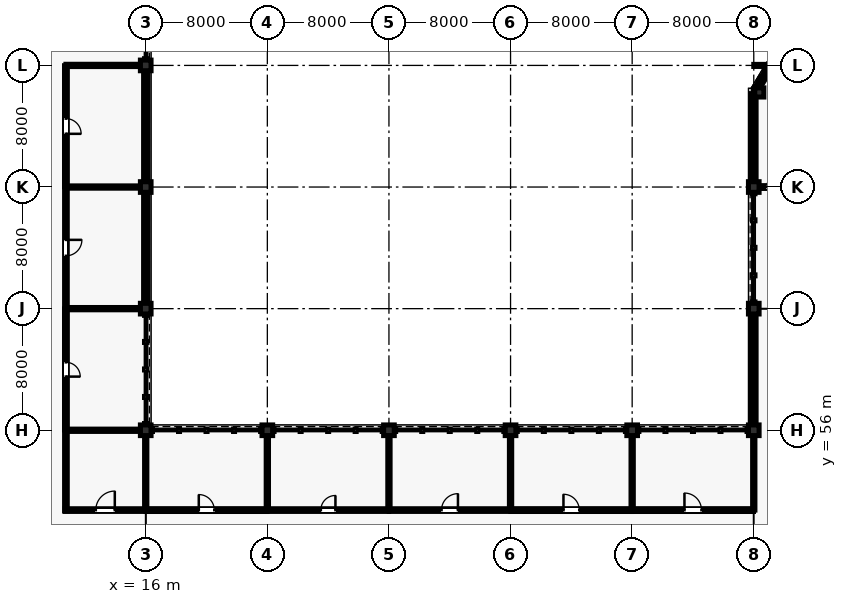
"""IFC4 building model, lengths in metres.
Left out: names, types, materials, properties, quantities, classifications, styles, units other than length and angle.
Written with IfcOpenShell. Run it as: python <this file> out.ifc"""

import sys

from ifc_helpers import new_model, si_unit, direction, frame, frame_2d, origin, origin_2d, place, context, subcontext, project, spatial, rectangle, extrude, element, fill, save


model = new_model("IFC4")
c1 = context("Model", 3, precision=1e-05, world=origin(), true_north=direction((0.0, 1.0)))
c2 = subcontext(c1, "Body", "Model", "MODEL_VIEW")
j1 = project(units=[si_unit("LENGTHUNIT", "METRE"), si_unit("PLANEANGLEUNIT", "RADIAN")], contexts=[c1])
p1 = place(None, origin())
s1 = spatial("IfcSite", under=j1, at=p1, CompositionType="ELEMENT")
p2 = place(p1, origin())
s2 = spatial("IfcBuilding", under=s1, at=p2, CompositionType="ELEMENT")
p3 = place(p2, origin())
s3 = spatial("IfcBuildingStorey", under=s2, at=p3, CompositionType="ELEMENT", Elevation=0.0)
for number, where, z_axis, x_axis in (
    (1, (16.0, 56.0, 0.0), (0.0, 0.0, 1.0), (1.0, 0.0, 0.0)),
    (2, (16.0, 64.0, 0.0), (0.0, 0.0, 1.0), (1.0, 0.0, 0.0)),
    (3, (16.0, 72.0, 0.0), (0.0, 0.0, 1.0), (1.0, 0.0, 0.0)),
    (4, (16.0, 80.0, 0.0), (0.0, 0.0, 1.0), (1.0, 0.0, 0.0)),
    (5, (24.0, 56.0, 0.0), (0.0, 0.0, 1.0), (1.0, 0.0, 0.0)),
    (6, (32.0, 56.0, 0.0), (0.0, 0.0, 1.0), (1.0, 0.0, 0.0)),
    (7, (40.0, 56.0, 0.0), (0.0, 0.0, 1.0), (1.0, 0.0, 0.0)),
    (8, (48.0, 56.0, 0.0), (0.0, 0.0, 1.0), (1.0, 0.0, 0.0)),
    (9, (56.0, 56.0, 0.0), (0.0, 0.0, 1.0), (1.0, 0.0, 0.0)),
    (10, (56.0, 64.0, 0.0), (0.0, 0.0, 1.0), (1.0, 0.0, 0.0)),
    (11, (56.0, 72.0, 0.0), (0.0, 0.0, 1.0), (1.0, 0.0, 0.0)),
):
    element("IfcColumn", number, at=place(p3, frame(where, z_axis=z_axis, x_axis=x_axis)), inside=s3, PredefinedType="COLUMN", context=c2, shape_type="SweptSolid", body=[
        extrude(rectangle(XDim=0.7, YDim=0.7, at=origin_2d()), origin(), (0.0, 0.0, 1.0), 5.28),
    ])
p4 = place(p3, frame((56.364, 78.221, 0.0), z_axis=(0.0, 0.0, 1.0), x_axis=(1.0, 0.0, 0.0)))
e12 = element("IfcColumn", 12, at=p4, inside=s3, PredefinedType="COLUMN", context=c2, shape_type="SweptSolid", body=[
    extrude(rectangle(XDim=0.6, YDim=0.6, at=origin_2d()), origin(), (0.0, 0.0, 1.0), 5.28),
])
p5 = place(p3, frame((57.059, 79.888, 0.0), z_axis=(0.0, 0.0, 1.0), x_axis=(-0.51607516088, -0.856543302071, 0.0)))
e13 = element("IfcWall", 13, at=p5, inside=s3, PredefinedType="SOLIDWALL", context=c2, shape_type="SweptSolid", body=[
    extrude(rectangle(XDim=1.795, YDim=0.305, at=frame_2d((0.897, 0.0))), origin(), (0.0, 0.0, 1.0), 5.035),
])
p6 = place(p3, frame((16.0, 64.335, 0.0), z_axis=(0.0, 0.0, 1.0), x_axis=(0.0, 1.0, 0.0)))
e14 = element("IfcWall", 14, at=p6, inside=s3, PredefinedType="SOLIDWALL", context=c2, shape_type="SweptSolid", body=[
    extrude(rectangle(XDim=7.33, YDim=0.28, at=frame_2d((3.665, 0.0))), origin(), (0.0, 0.0, 1.0), 4.619),
])
p7 = place(p6, frame((2.59, 0.0, 0.9)))
e15 = element("IfcOpeningElement", 15, at=p7, cuts=e14, PredefinedType="OPENING", context=c2, shape_type="SweptSolid", body=[
    extrude(rectangle(XDim=2.15, YDim=2.8, at=frame_2d((1.075, 1.4))), frame((0.0, 0.15, 0.0), z_axis=(0.0, -1.0, 0.0), x_axis=(1.0, 0.0, 0.0)), (0.0, 0.0, 1.0), 0.3),
])
p8 = place(p3, frame((16.0, 72.335, 0.0), z_axis=(0.0, 0.0, 1.0), x_axis=(0.0, 1.0, 0.0)))
e16 = element("IfcWall", 16, at=p8, inside=s3, PredefinedType="SOLIDWALL", context=c2, shape_type="SweptSolid", body=[
    extrude(rectangle(XDim=7.33, YDim=0.28, at=frame_2d((3.665, 0.0))), origin(), (0.0, 0.0, 1.0), 4.682),
])
p9 = place(p8, frame((2.74, 0.0, 0.9)))
e17 = element("IfcOpeningElement", 17, at=p9, cuts=e16, PredefinedType="OPENING", context=c2, shape_type="SweptSolid", body=[
    extrude(rectangle(XDim=1.85, YDim=2.65, at=frame_2d((0.925, 1.325))), frame((0.0, 0.15, 0.0), z_axis=(0.0, -1.0, 0.0), x_axis=(1.0, 0.0, 0.0)), (0.0, 0.0, 1.0), 0.3),
])
p10 = place(p3, frame((56.0, 56.335, 0.0), z_axis=(0.0, 0.0, 1.0), x_axis=(0.0, 1.0, 0.0)))
e18 = element("IfcWall", 18, at=p10, inside=s3, PredefinedType="SOLIDWALL", context=c2, shape_type="SweptSolid", body=[
    extrude(rectangle(XDim=7.33, YDim=0.305, at=frame_2d((3.665, 0.0))), origin(), (0.0, 0.0, 1.0), 4.614),
])
p11 = place(p10, frame((0.744, 0.0, 0.95)))
e19 = element("IfcOpeningElement", 19, at=p11, cuts=e18, PredefinedType="OPENING", context=c2, shape_type="SweptSolid", body=[
    extrude(rectangle(XDim=1.15, YDim=1.65, at=frame_2d((0.575, 0.825))), frame((0.0, 0.162, 0.0), z_axis=(0.0, -1.0, 0.0), x_axis=(1.0, 0.0, 0.0)), (0.0, 0.0, 1.0), 0.325),
])
p12 = place(p10, frame((5.436, 0.0, 0.95)))
e20 = element("IfcOpeningElement", 20, at=p12, cuts=e18, PredefinedType="OPENING", context=c2, shape_type="SweptSolid", body=[
    extrude(rectangle(XDim=1.15, YDim=1.65, at=frame_2d((0.575, 0.825))), frame((0.0, 0.162, 0.0), z_axis=(0.0, -1.0, 0.0), x_axis=(1.0, 0.0, 0.0)), (0.0, 0.0, 1.0), 0.325),
])
p13 = place(p3, frame((56.0, 72.335, 0.0), z_axis=(0.0, 0.0, 1.0), x_axis=(0.0, 1.0, 0.0)))
e21 = element("IfcWall", 21, at=p13, inside=s3, PredefinedType="SOLIDWALL", context=c2, shape_type="SweptSolid", body=[
    extrude(rectangle(XDim=5.811, YDim=0.305, at=frame_2d((2.905, 0.0))), origin(), (0.0, 0.0, 1.0), 5.035),
])
p14 = place(p13, frame((1.705, 0.0, 0.9)))
e22 = element("IfcOpeningElement", 22, at=p14, cuts=e21, PredefinedType="OPENING", context=c2, shape_type="SweptSolid", body=[
    extrude(rectangle(XDim=2.4, YDim=2.8, at=frame_2d((1.2, 1.4))), frame((0.0, 0.162, 0.0), z_axis=(0.0, -1.0, 0.0), x_axis=(1.0, 0.0, 0.0)), (0.0, 0.0, 1.0), 0.325),
])
p15 = place(p3, frame((10.7, 50.75, 0.0), z_axis=(0.0, 0.0, 1.0), x_axis=(1.0, 0.0, 0.0)))
e23 = element("IfcWall", 23, at=p15, inside=s3, PredefinedType="PARTITIONING", context=c2, shape_type="SweptSolid", body=[
    extrude(rectangle(XDim=5.28, YDim=0.175, at=frame_2d((2.64, 0.0))), origin(), (0.0, 0.0, 1.0), 4.403),
])
p16 = place(p15, frame((2.015, 0.0, 0.0)))
e24 = element("IfcOpeningElement", 24, at=p16, cuts=e23, PredefinedType="OPENING", context=c2, shape_type="SweptSolid", body=[
    extrude(rectangle(XDim=1.25, YDim=2.18, at=frame_2d((0.625, 1.09))), frame((0.0, 0.097, 0.0), z_axis=(0.0, -1.0, 0.0), x_axis=(1.0, 0.0, 0.0)), (0.0, 0.0, 1.0), 0.195),
])
p17 = place(p3, frame((10.75, 50.7, 0.0), z_axis=(0.0, 0.0, 1.0), x_axis=(0.0, 1.0, 0.0)))
e25 = element("IfcWall", 25, at=p17, inside=s3, PredefinedType="PARTITIONING", context=c2, shape_type="SweptSolid", body=[
    extrude(rectangle(XDim=5.28, YDim=0.175, at=frame_2d((2.64, 0.0))), origin(), (0.0, 0.0, 1.0), 4.327),
])
p18 = place(p3, frame((10.75, 56.0, 0.0), z_axis=(0.0, 0.0, 1.0), x_axis=(1.0, 0.0, 0.0)))
e26 = element("IfcWall", 26, at=p18, inside=s3, PredefinedType="PARTITIONING", context=c2, shape_type="SweptSolid", body=[
    extrude(rectangle(XDim=4.89, YDim=0.15, at=frame_2d((2.445, 0.0))), origin(), (0.0, 0.0, 1.0), 4.327),
])
p19 = place(p3, frame((16.0, 50.75, 0.0), z_axis=(0.0, 0.0, 1.0), x_axis=(0.0, 1.0, 0.0)))
e27 = element("IfcWall", 27, at=p19, inside=s3, PredefinedType="PARTITIONING", context=c2, shape_type="SweptSolid", body=[
    extrude(rectangle(XDim=4.89, YDim=0.15, at=frame_2d((2.445, 0.0))), origin(), (0.0, 0.0, 1.0), 4.403),
])
p20 = place(p3, frame((10.75, 56.02, 0.0), z_axis=(0.0, 0.0, 1.0), x_axis=(0.0, 1.0, 0.0)))
e28 = element("IfcWall", 28, at=p20, inside=s3, PredefinedType="PARTITIONING", context=c2, shape_type="SweptSolid", body=[
    extrude(rectangle(XDim=7.96, YDim=0.185, at=frame_2d((3.98, 0.0))), origin(), (0.0, 0.0, 1.0), 4.327),
])
p21 = place(p20, frame((3.51, 0.0, 0.0)))
e29 = element("IfcOpeningElement", 29, at=p21, cuts=e28, PredefinedType="OPENING", context=c2, shape_type="SweptSolid", body=[
    extrude(rectangle(XDim=0.94, YDim=2.12, at=frame_2d((0.47, 1.06))), frame((0.0, 0.103, 0.0), z_axis=(0.0, -1.0, 0.0), x_axis=(1.0, 0.0, 0.0)), (0.0, 0.0, 1.0), 0.205),
])
p22 = place(p3, frame((10.75, 64.0, 0.0), z_axis=(0.0, 0.0, 1.0), x_axis=(1.0, 0.0, 0.0)))
e30 = element("IfcWall", 30, at=p22, inside=s3, PredefinedType="PARTITIONING", context=c2, shape_type="SweptSolid", body=[
    extrude(rectangle(XDim=4.89, YDim=0.15, at=frame_2d((2.445, 0.0))), origin(), (0.0, 0.0, 1.0), 4.408),
])
p23 = place(p3, frame((10.75, 64.02, 0.0), z_axis=(0.0, 0.0, 1.0), x_axis=(0.0, 1.0, 0.0)))
e31 = element("IfcWall", 31, at=p23, inside=s3, PredefinedType="PARTITIONING", context=c2, shape_type="SweptSolid", body=[
    extrude(rectangle(XDim=7.96, YDim=0.175, at=frame_2d((3.98, 0.0))), origin(), (0.0, 0.0, 1.0), 4.341),
])
p24 = place(p23, frame((3.455, 0.0, 0.0)))
e32 = element("IfcOpeningElement", 32, at=p24, cuts=e31, PredefinedType="OPENING", context=c2, shape_type="SweptSolid", body=[
    extrude(rectangle(XDim=1.05, YDim=2.15, at=frame_2d((0.525, 1.075))), frame((0.0, 0.097, 0.0), z_axis=(0.0, -1.0, 0.0), x_axis=(1.0, 0.0, 0.0)), (0.0, 0.0, 1.0), 0.195),
])
p25 = place(p3, frame((10.75, 72.0, 0.0), z_axis=(0.0, 0.0, 1.0), x_axis=(1.0, 0.0, 0.0)))
e33 = element("IfcWall", 33, at=p25, inside=s3, PredefinedType="PARTITIONING", context=c2, shape_type="SweptSolid", body=[
    extrude(rectangle(XDim=4.89, YDim=0.15, at=frame_2d((2.445, 0.0))), origin(), (0.0, 0.0, 1.0), 4.341),
])
p26 = place(p3, frame((10.75, 72.02, 0.0), z_axis=(0.0, 0.0, 1.0), x_axis=(0.0, 1.0, 0.0)))
e34 = element("IfcWall", 34, at=p26, inside=s3, PredefinedType="PARTITIONING", context=c2, shape_type="SweptSolid", body=[
    extrude(rectangle(XDim=7.96, YDim=0.185, at=frame_2d((3.98, 0.0))), origin(), (0.0, 0.0, 1.0), 4.341),
])
p27 = place(p26, frame((3.48, 0.0, 0.0)))
e35 = element("IfcOpeningElement", 35, at=p27, cuts=e34, PredefinedType="OPENING", context=c2, shape_type="SweptSolid", body=[
    extrude(rectangle(XDim=1.0, YDim=2.15, at=frame_2d((0.5, 1.075))), frame((0.0, 0.103, 0.0), z_axis=(0.0, -1.0, 0.0), x_axis=(1.0, 0.0, 0.0)), (0.0, 0.0, 1.0), 0.205),
])
p28 = place(p3, frame((10.75, 80.0, 0.0), z_axis=(0.0, 0.0, 1.0), x_axis=(1.0, 0.0, 0.0)))
e36 = element("IfcWall", 36, at=p28, inside=s3, PredefinedType="PARTITIONING", context=c2, shape_type="SweptSolid", body=[
    extrude(rectangle(XDim=4.89, YDim=0.15, at=frame_2d((2.445, 0.0))), origin(), (0.0, 0.0, 1.0), 4.409),
])
p29 = place(p3, frame((16.02, 50.75, 0.0), z_axis=(0.0, 0.0, 1.0), x_axis=(1.0, 0.0, 0.0)))
e37 = element("IfcWall", 37, at=p29, inside=s3, PredefinedType="PARTITIONING", context=c2, shape_type="SweptSolid", body=[
    extrude(rectangle(XDim=7.96, YDim=0.185, at=frame_2d((3.98, 0.0))), origin(), (0.0, 0.0, 1.0), 4.403),
])
p30 = place(p29, frame((3.47, 0.0, 0.0)))
e38 = element("IfcOpeningElement", 38, at=p30, cuts=e37, PredefinedType="OPENING", context=c2, shape_type="SweptSolid", body=[
    extrude(rectangle(XDim=1.02, YDim=2.2, at=frame_2d((0.51, 1.1))), frame((0.0, 0.103, 0.0), z_axis=(0.0, -1.0, 0.0), x_axis=(1.0, 0.0, 0.0)), (0.0, 0.0, 1.0), 0.205),
])
p31 = place(p3, frame((24.0, 50.75, 0.0), z_axis=(0.0, 0.0, 1.0), x_axis=(0.0, 1.0, 0.0)))
e39 = element("IfcWall", 39, at=p31, inside=s3, PredefinedType="PARTITIONING", context=c2, shape_type="SweptSolid", body=[
    extrude(rectangle(XDim=4.89, YDim=0.15, at=frame_2d((2.445, 0.0))), origin(), (0.0, 0.0, 1.0), 4.412),
])
p32 = place(p3, frame((24.02, 50.75, 0.0), z_axis=(0.0, 0.0, 1.0), x_axis=(1.0, 0.0, 0.0)))
e40 = element("IfcWall", 40, at=p32, inside=s3, PredefinedType="PARTITIONING", context=c2, shape_type="SweptSolid", body=[
    extrude(rectangle(XDim=7.96, YDim=0.175, at=frame_2d((3.98, 0.0))), origin(), (0.0, 0.0, 1.0), 4.404),
])
p33 = place(p32, frame((3.5, 0.0, 0.0)))
e41 = element("IfcOpeningElement", 41, at=p33, cuts=e40, PredefinedType="OPENING", context=c2, shape_type="SweptSolid", body=[
    extrude(rectangle(XDim=0.96, YDim=2.14, at=frame_2d((0.48, 1.07))), frame((0.0, 0.097, 0.0), z_axis=(0.0, -1.0, 0.0), x_axis=(1.0, 0.0, 0.0)), (0.0, 0.0, 1.0), 0.195),
])
p34 = place(p3, frame((32.0, 50.75, 0.0), z_axis=(0.0, 0.0, 1.0), x_axis=(0.0, 1.0, 0.0)))
e42 = element("IfcWall", 42, at=p34, inside=s3, PredefinedType="PARTITIONING", context=c2, shape_type="SweptSolid", body=[
    extrude(rectangle(XDim=4.89, YDim=0.15, at=frame_2d((2.445, 0.0))), origin(), (0.0, 0.0, 1.0), 4.404),
])
p35 = place(p3, frame((32.02, 50.75, 0.0), z_axis=(0.0, 0.0, 1.0), x_axis=(1.0, 0.0, 0.0)))
e43 = element("IfcWall", 43, at=p35, inside=s3, PredefinedType="PARTITIONING", context=c2, shape_type="SweptSolid", body=[
    extrude(rectangle(XDim=7.96, YDim=0.175, at=frame_2d((3.98, 0.0))), origin(), (0.0, 0.0, 1.0), 4.404),
])
p36 = place(p35, frame((3.44, 0.0, 0.0)))
e44 = element("IfcOpeningElement", 44, at=p36, cuts=e43, PredefinedType="OPENING", context=c2, shape_type="SweptSolid", body=[
    extrude(rectangle(XDim=1.08, YDim=2.2, at=frame_2d((0.54, 1.1))), frame((0.0, 0.097, 0.0), z_axis=(0.0, -1.0, 0.0), x_axis=(1.0, 0.0, 0.0)), (0.0, 0.0, 1.0), 0.195),
])
p37 = place(p3, frame((40.0, 50.75, 0.0), z_axis=(0.0, 0.0, 1.0), x_axis=(0.0, 1.0, 0.0)))
e45 = element("IfcWall", 45, at=p37, inside=s3, PredefinedType="PARTITIONING", context=c2, shape_type="SweptSolid", body=[
    extrude(rectangle(XDim=4.89, YDim=0.15, at=frame_2d((2.445, 0.0))), origin(), (0.0, 0.0, 1.0), 4.471),
])
p38 = place(p3, frame((40.02, 50.75, 0.0), z_axis=(0.0, 0.0, 1.0), x_axis=(1.0, 0.0, 0.0)))
e46 = element("IfcWall", 46, at=p38, inside=s3, PredefinedType="PARTITIONING", context=c2, shape_type="SweptSolid", body=[
    extrude(rectangle(XDim=7.96, YDim=0.185, at=frame_2d((3.98, 0.0))), origin(), (0.0, 0.0, 1.0), 4.403),
])
p39 = place(p38, frame((3.46, 0.0, 0.0)))
e47 = element("IfcOpeningElement", 47, at=p39, cuts=e46, PredefinedType="OPENING", context=c2, shape_type="SweptSolid", body=[
    extrude(rectangle(XDim=1.04, YDim=2.18, at=frame_2d((0.52, 1.09))), frame((0.0, 0.103, 0.0), z_axis=(0.0, -1.0, 0.0), x_axis=(1.0, 0.0, 0.0)), (0.0, 0.0, 1.0), 0.205),
])
p40 = place(p3, frame((48.0, 50.75, 0.0), z_axis=(0.0, 0.0, 1.0), x_axis=(0.0, 1.0, 0.0)))
e48 = element("IfcWall", 48, at=p40, inside=s3, PredefinedType="PARTITIONING", context=c2, shape_type="SweptSolid", body=[
    extrude(rectangle(XDim=4.89, YDim=0.15, at=frame_2d((2.445, 0.0))), origin(), (0.0, 0.0, 1.0), 4.403),
])
p41 = place(p3, frame((48.02, 50.75, 0.0), z_axis=(0.0, 0.0, 1.0), x_axis=(1.0, 0.0, 0.0)))
e49 = element("IfcWall", 49, at=p41, inside=s3, PredefinedType="PARTITIONING", context=c2, shape_type="SweptSolid", body=[
    extrude(rectangle(XDim=7.96, YDim=0.185, at=frame_2d((3.98, 0.0))), origin(), (0.0, 0.0, 1.0), 4.403),
])
p42 = place(p41, frame((3.42, 0.0, 0.0)))
e50 = element("IfcOpeningElement", 50, at=p42, cuts=e49, PredefinedType="OPENING", context=c2, shape_type="SweptSolid", body=[
    extrude(rectangle(XDim=1.12, YDim=2.22, at=frame_2d((0.56, 1.11))), frame((0.0, 0.103, 0.0), z_axis=(0.0, -1.0, 0.0), x_axis=(1.0, 0.0, 0.0)), (0.0, 0.0, 1.0), 0.205),
])
p43 = place(p3, frame((56.0, 50.75, 0.0), z_axis=(0.0, 0.0, 1.0), x_axis=(0.0, 1.0, 0.0)))
e51 = element("IfcWall", 51, at=p43, inside=s3, PredefinedType="PARTITIONING", context=c2, shape_type="SweptSolid", body=[
    extrude(rectangle(XDim=4.89, YDim=0.15, at=frame_2d((2.445, 0.0))), origin(), (0.0, 0.0, 1.0), 4.412),
])
p44 = place(p3, frame((56.34, 72.0, 0.0), z_axis=(0.0, 0.0, 1.0), x_axis=(1.0, 0.0, 0.0)))
e52 = element("IfcWall", 52, at=p44, inside=s3, PredefinedType="PARTITIONING", context=c2, shape_type="SweptSolid", body=[
    extrude(rectangle(XDim=7.32, YDim=0.185, at=frame_2d((3.66, 0.0))), origin(), (0.0, 0.0, 1.0), 4.327),
])
p45 = place(p44, frame((0.52, 0.0, 0.0)))
e53 = element("IfcOpeningElement", 53, at=p45, cuts=e52, PredefinedType="OPENING", context=c2, shape_type="SweptSolid", body=[
    extrude(rectangle(XDim=0.94, YDim=2.12, at=frame_2d((0.47, 1.06))), frame((0.0, 0.103, 0.0), z_axis=(0.0, -1.0, 0.0), x_axis=(1.0, 0.0, 0.0)), (0.0, 0.0, 1.0), 0.205),
])
p46 = place(p3, frame((56.0, 80.0, 0.0), z_axis=(0.0, 0.0, 1.0), x_axis=(1.0, 0.0, 0.0)))
e54 = element("IfcWall", 54, at=p46, inside=s3, PredefinedType="PARTITIONING", context=c2, shape_type="SweptSolid", body=[
    extrude(rectangle(XDim=7.66, YDim=0.135, at=frame_2d((3.83, 0.0))), origin(), (0.0, 0.0, 1.0), 5.025),
])
p47 = place(p7, origin())
e55 = element("IfcWindow", 55, at=p47, inside=s3, PartitioningType="SINGLE_PANEL", PredefinedType="WINDOW", context=c2, shape_type="SweptSolid", body=[
    extrude(rectangle(XDim=2.15, YDim=2.8, at=frame_2d((1.075, 1.4))), frame((0.0, 0.03, 0.0), z_axis=(0.0, -1.0, 0.0), x_axis=(1.0, 0.0, 0.0)), (0.0, 0.0, 1.0), 0.06),
])
fill(e15, e55)
p48 = place(p9, origin())
e56 = element("IfcWindow", 56, at=p48, inside=s3, PartitioningType="SINGLE_PANEL", PredefinedType="WINDOW", context=c2, shape_type="SweptSolid", body=[
    extrude(rectangle(XDim=1.85, YDim=2.65, at=frame_2d((0.925, 1.325))), frame((0.0, 0.03, 0.0), z_axis=(0.0, -1.0, 0.0), x_axis=(1.0, 0.0, 0.0)), (0.0, 0.0, 1.0), 0.06),
])
fill(e17, e56)
p49 = place(p11, origin())
e57 = element("IfcWindow", 57, at=p49, inside=s3, PartitioningType="SINGLE_PANEL", PredefinedType="WINDOW", context=c2, shape_type="SweptSolid", body=[
    extrude(rectangle(XDim=1.15, YDim=1.65, at=frame_2d((0.575, 0.825))), frame((0.0, 0.03, 0.0), z_axis=(0.0, -1.0, 0.0), x_axis=(1.0, 0.0, 0.0)), (0.0, 0.0, 1.0), 0.06),
])
fill(e19, e57)
p50 = place(p12, origin())
e58 = element("IfcWindow", 58, at=p50, inside=s3, PartitioningType="SINGLE_PANEL", PredefinedType="WINDOW", context=c2, shape_type="SweptSolid", body=[
    extrude(rectangle(XDim=1.15, YDim=1.65, at=frame_2d((0.575, 0.825))), frame((0.0, 0.03, 0.0), z_axis=(0.0, -1.0, 0.0), x_axis=(1.0, 0.0, 0.0)), (0.0, 0.0, 1.0), 0.06),
])
fill(e20, e58)
p51 = place(p14, origin())
e59 = element("IfcWindow", 59, at=p51, inside=s3, PartitioningType="SINGLE_PANEL", PredefinedType="WINDOW", context=c2, shape_type="SweptSolid", body=[
    extrude(rectangle(XDim=2.4, YDim=2.8, at=frame_2d((1.2, 1.4))), frame((0.0, 0.03, 0.0), z_axis=(0.0, -1.0, 0.0), x_axis=(1.0, 0.0, 0.0)), (0.0, 0.0, 1.0), 0.06),
])
fill(e22, e59)
p52 = place(p16, origin())
e60 = element("IfcDoor", 60, at=p52, inside=s3, OperationType="SINGLE_SWING_RIGHT", PredefinedType="DOOR", context=c2, shape_type="SweptSolid", body=[
    extrude(rectangle(XDim=1.25, YDim=2.18, at=frame_2d((0.625, 1.09))), frame((0.0, 0.025, 0.0), z_axis=(0.0, -1.0, 0.0), x_axis=(1.0, 0.0, 0.0)), (0.0, 0.0, 1.0), 0.05),
])
fill(e24, e60)
p53 = place(p21, frame((0.94, 0.0, 0.0), z_axis=(0.0, 0.0, 1.0), x_axis=(-1.0, 0.0, 0.0)))
e61 = element("IfcDoor", 61, at=p53, inside=s3, OperationType="SINGLE_SWING_LEFT", PredefinedType="DOOR", context=c2, shape_type="SweptSolid", body=[
    extrude(rectangle(XDim=0.94, YDim=2.12, at=frame_2d((0.47, 1.06))), frame((0.0, 0.025, 0.0), z_axis=(0.0, -1.0, 0.0), x_axis=(1.0, 0.0, 0.0)), (0.0, 0.0, 1.0), 0.05),
])
fill(e29, e61)
p54 = place(p24, frame((1.05, 0.0, 0.0), z_axis=(0.0, 0.0, 1.0), x_axis=(-1.0, 0.0, 0.0)))
e62 = element("IfcDoor", 62, at=p54, inside=s3, OperationType="SINGLE_SWING_RIGHT", PredefinedType="DOOR", context=c2, shape_type="SweptSolid", body=[
    extrude(rectangle(XDim=1.05, YDim=2.15, at=frame_2d((0.525, 1.075))), frame((0.0, 0.025, 0.0), z_axis=(0.0, -1.0, 0.0), x_axis=(1.0, 0.0, 0.0)), (0.0, 0.0, 1.0), 0.05),
])
fill(e32, e62)
p55 = place(p27, frame((1.0, 0.0, 0.0), z_axis=(0.0, 0.0, 1.0), x_axis=(-1.0, 0.0, 0.0)))
e63 = element("IfcDoor", 63, at=p55, inside=s3, OperationType="SINGLE_SWING_LEFT", PredefinedType="DOOR", context=c2, shape_type="SweptSolid", body=[
    extrude(rectangle(XDim=1.0, YDim=2.15, at=frame_2d((0.5, 1.075))), frame((0.0, 0.025, 0.0), z_axis=(0.0, -1.0, 0.0), x_axis=(1.0, 0.0, 0.0)), (0.0, 0.0, 1.0), 0.05),
])
fill(e35, e63)
p56 = place(p30, origin())
e64 = element("IfcDoor", 64, at=p56, inside=s3, OperationType="SINGLE_SWING_LEFT", PredefinedType="DOOR", context=c2, shape_type="SweptSolid", body=[
    extrude(rectangle(XDim=1.02, YDim=2.2, at=frame_2d((0.51, 1.1))), frame((0.0, 0.025, 0.0), z_axis=(0.0, -1.0, 0.0), x_axis=(1.0, 0.0, 0.0)), (0.0, 0.0, 1.0), 0.05),
])
fill(e38, e64)
p57 = place(p33, origin())
e65 = element("IfcDoor", 65, at=p57, inside=s3, OperationType="SINGLE_SWING_RIGHT", PredefinedType="DOOR", context=c2, shape_type="SweptSolid", body=[
    extrude(rectangle(XDim=0.96, YDim=2.14, at=frame_2d((0.48, 1.07))), frame((0.0, 0.025, 0.0), z_axis=(0.0, -1.0, 0.0), x_axis=(1.0, 0.0, 0.0)), (0.0, 0.0, 1.0), 0.05),
])
fill(e41, e65)
p58 = place(p36, origin())
e66 = element("IfcDoor", 66, at=p58, inside=s3, OperationType="SINGLE_SWING_RIGHT", PredefinedType="DOOR", context=c2, shape_type="SweptSolid", body=[
    extrude(rectangle(XDim=1.08, YDim=2.2, at=frame_2d((0.54, 1.1))), frame((0.0, 0.025, 0.0), z_axis=(0.0, -1.0, 0.0), x_axis=(1.0, 0.0, 0.0)), (0.0, 0.0, 1.0), 0.05),
])
fill(e44, e66)
p59 = place(p39, origin())
e67 = element("IfcDoor", 67, at=p59, inside=s3, OperationType="SINGLE_SWING_LEFT", PredefinedType="DOOR", context=c2, shape_type="SweptSolid", body=[
    extrude(rectangle(XDim=1.04, YDim=2.18, at=frame_2d((0.52, 1.09))), frame((0.0, 0.025, 0.0), z_axis=(0.0, -1.0, 0.0), x_axis=(1.0, 0.0, 0.0)), (0.0, 0.0, 1.0), 0.05),
])
fill(e47, e67)
p60 = place(p42, origin())
e68 = element("IfcDoor", 68, at=p60, inside=s3, OperationType="SINGLE_SWING_LEFT", PredefinedType="DOOR", context=c2, shape_type="SweptSolid", body=[
    extrude(rectangle(XDim=1.12, YDim=2.22, at=frame_2d((0.56, 1.11))), frame((0.0, 0.025, 0.0), z_axis=(0.0, -1.0, 0.0), x_axis=(1.0, 0.0, 0.0)), (0.0, 0.0, 1.0), 0.05),
])
fill(e50, e68)
p61 = place(p45, origin())
e69 = element("IfcDoor", 69, at=p61, inside=s3, OperationType="SINGLE_SWING_RIGHT", PredefinedType="DOOR", context=c2, shape_type="SweptSolid", body=[
    extrude(rectangle(XDim=0.94, YDim=2.12, at=frame_2d((0.47, 1.06))), frame((0.0, 0.025, 0.0), z_axis=(0.0, -1.0, 0.0), x_axis=(1.0, 0.0, 0.0)), (0.0, 0.0, 1.0), 0.05),
])
fill(e53, e69)
save(model, sys.argv[1])
